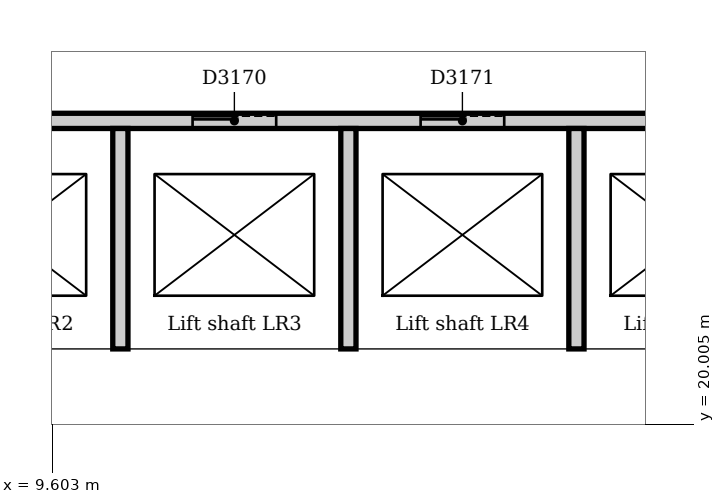
"""IFC4 building model, lengths in metres.
Left out: names, types, materials, properties, quantities, classifications, styles, units other than length and angle.
Written with IfcOpenShell. Run it as: python <this file> out.ifc"""

import sys

from ifc_helpers import new_model, si_unit, direction, frame, frame_2d, origin, place, context, subcontext, project, spatial, rectangle, extrude, element, fill, save


model = new_model("IFC4")
c1 = context("Model", 3, precision=1e-05, world=origin(), true_north=direction((0.0, 1.0)))
c2 = subcontext(c1, "Body", "Model", "MODEL_VIEW")
j1 = project(units=[si_unit("LENGTHUNIT", "METRE"), si_unit("PLANEANGLEUNIT", "RADIAN")], contexts=[c1])
p1 = place(None, origin())
s1 = spatial("IfcSite", under=j1, at=p1, CompositionType="ELEMENT")
p2 = place(p1, origin())
s2 = spatial("IfcBuilding", under=s1, at=p2, CompositionType="ELEMENT")
p3 = place(p2, frame((0.0, 0.0, 21.0)))
s3 = spatial("IfcBuildingStorey", under=s2, at=p3, CompositionType="ELEMENT", Elevation=21.0)
p4 = place(p3, frame((3.9, 20.4, 0.0), z_axis=(0.0, 0.0, 1.0), x_axis=(1.0, 0.0, 0.0)))
e1 = element("IfcWall", 1, at=p4, inside=s3, PredefinedType="SOLIDWALL", context=c2, shape_type="SweptSolid", body=[
    extrude(rectangle(XDim=19.8, YDim=1.2, at=frame_2d((9.9, 0.0))), origin(), (0.0, 0.0, 1.0), 5.0),
])
p5 = place(p3, frame((4.5, 24.0, 0.0), z_axis=(0.0, 0.0, 1.0), x_axis=(1.0, 0.0, 0.0)))
e2 = element("IfcWall", 2, at=p5, inside=s3, PredefinedType="PARTITIONING", context=c2, shape_type="SweptSolid", body=[
    extrude(rectangle(XDim=18.0, YDim=0.2, at=frame_2d((9.0, 0.0))), origin(), (0.0, 0.0, 1.0), 4.85),
])
p6 = place(p5, frame((0.95, 0.0, 0.0)))
e3 = element("IfcOpeningElement", 3, at=p6, cuts=e2, PredefinedType="OPENING", context=c2, shape_type="SweptSolid", body=[
    extrude(rectangle(XDim=1.1, YDim=2.1, at=frame_2d((0.55, 1.05))), frame((0.0, 0.11, 0.0), z_axis=(0.0, -1.0, 0.0), x_axis=(1.0, 0.0, 0.0)), (0.0, 0.0, 1.0), 0.22),
])
p7 = place(p5, frame((3.95, 0.0, 0.0)))
e4 = element("IfcOpeningElement", 4, at=p7, cuts=e2, PredefinedType="OPENING", context=c2, shape_type="SweptSolid", body=[
    extrude(rectangle(XDim=1.1, YDim=2.1, at=frame_2d((0.55, 1.05))), frame((0.0, 0.11, 0.0), z_axis=(0.0, -1.0, 0.0), x_axis=(1.0, 0.0, 0.0)), (0.0, 0.0, 1.0), 0.22),
])
p8 = place(p5, frame((6.95, 0.0, 0.0)))
e5 = element("IfcOpeningElement", 5, at=p8, cuts=e2, PredefinedType="OPENING", context=c2, shape_type="SweptSolid", body=[
    extrude(rectangle(XDim=1.1, YDim=2.1, at=frame_2d((0.55, 1.05))), frame((0.0, 0.11, 0.0), z_axis=(0.0, -1.0, 0.0), x_axis=(1.0, 0.0, 0.0)), (0.0, 0.0, 1.0), 0.22),
])
p9 = place(p5, frame((9.95, 0.0, 0.0)))
e6 = element("IfcOpeningElement", 6, at=p9, cuts=e2, PredefinedType="OPENING", context=c2, shape_type="SweptSolid", body=[
    extrude(rectangle(XDim=1.1, YDim=2.1, at=frame_2d((0.55, 1.05))), frame((0.0, 0.11, 0.0), z_axis=(0.0, -1.0, 0.0), x_axis=(1.0, 0.0, 0.0)), (0.0, 0.0, 1.0), 0.22),
])
p10 = place(p5, frame((12.95, 0.0, 0.0)))
e7 = element("IfcOpeningElement", 7, at=p10, cuts=e2, PredefinedType="OPENING", context=c2, shape_type="SweptSolid", body=[
    extrude(rectangle(XDim=1.1, YDim=2.1, at=frame_2d((0.55, 1.05))), frame((0.0, 0.11, 0.0), z_axis=(0.0, -1.0, 0.0), x_axis=(1.0, 0.0, 0.0)), (0.0, 0.0, 1.0), 0.22),
])
p11 = place(p5, frame((15.95, 0.0, 0.0)))
e8 = element("IfcOpeningElement", 8, at=p11, cuts=e2, PredefinedType="OPENING", context=c2, shape_type="SweptSolid", body=[
    extrude(rectangle(XDim=1.1, YDim=2.1, at=frame_2d((0.55, 1.05))), frame((0.0, 0.11, 0.0), z_axis=(0.0, -1.0, 0.0), x_axis=(1.0, 0.0, 0.0)), (0.0, 0.0, 1.0), 0.22),
])
for number, where, z_axis, x_axis in (
    (9, (10.5, 21.0, 0.0), (0.0, 0.0, 1.0), (0.0, 1.0, 0.0)),
    (10, (13.5, 21.0, 0.0), (0.0, 0.0, 1.0), (0.0, 1.0, 0.0)),
    (11, (16.5, 21.0, 0.0), (0.0, 0.0, 1.0), (0.0, 1.0, 0.0)),
):
    element("IfcWall", number, at=place(p3, frame(where, z_axis=z_axis, x_axis=x_axis)), inside=s3, PredefinedType="PARTITIONING", context=c2, shape_type="SweptSolid", body=[
        extrude(rectangle(XDim=2.9, YDim=0.2, at=frame_2d((1.45, 0.0))), origin(), (0.0, 0.0, 1.0), 4.85),
    ])
p12 = place(p8, origin())
e12 = element("IfcDoor", 12, at=p12, inside=s3, OperationType="SLIDING_TO_LEFT", PredefinedType="DOOR", context=c2, shape_type="SweptSolid", body=[
    extrude(rectangle(XDim=1.1, YDim=2.1, at=frame_2d((0.55, 1.05))), frame((0.0, 0.025, 0.0), z_axis=(0.0, -1.0, 0.0), x_axis=(1.0, 0.0, 0.0)), (0.0, 0.0, 1.0), 0.05),
])
fill(e5, e12)
p13 = place(p9, origin())
e13 = element("IfcDoor", 13, at=p13, inside=s3, OperationType="SLIDING_TO_LEFT", PredefinedType="DOOR", context=c2, shape_type="SweptSolid", body=[
    extrude(rectangle(XDim=1.1, YDim=2.1, at=frame_2d((0.55, 1.05))), frame((0.0, 0.025, 0.0), z_axis=(0.0, -1.0, 0.0), x_axis=(1.0, 0.0, 0.0)), (0.0, 0.0, 1.0), 0.05),
])
fill(e6, e13)
save(model, sys.argv[1])
